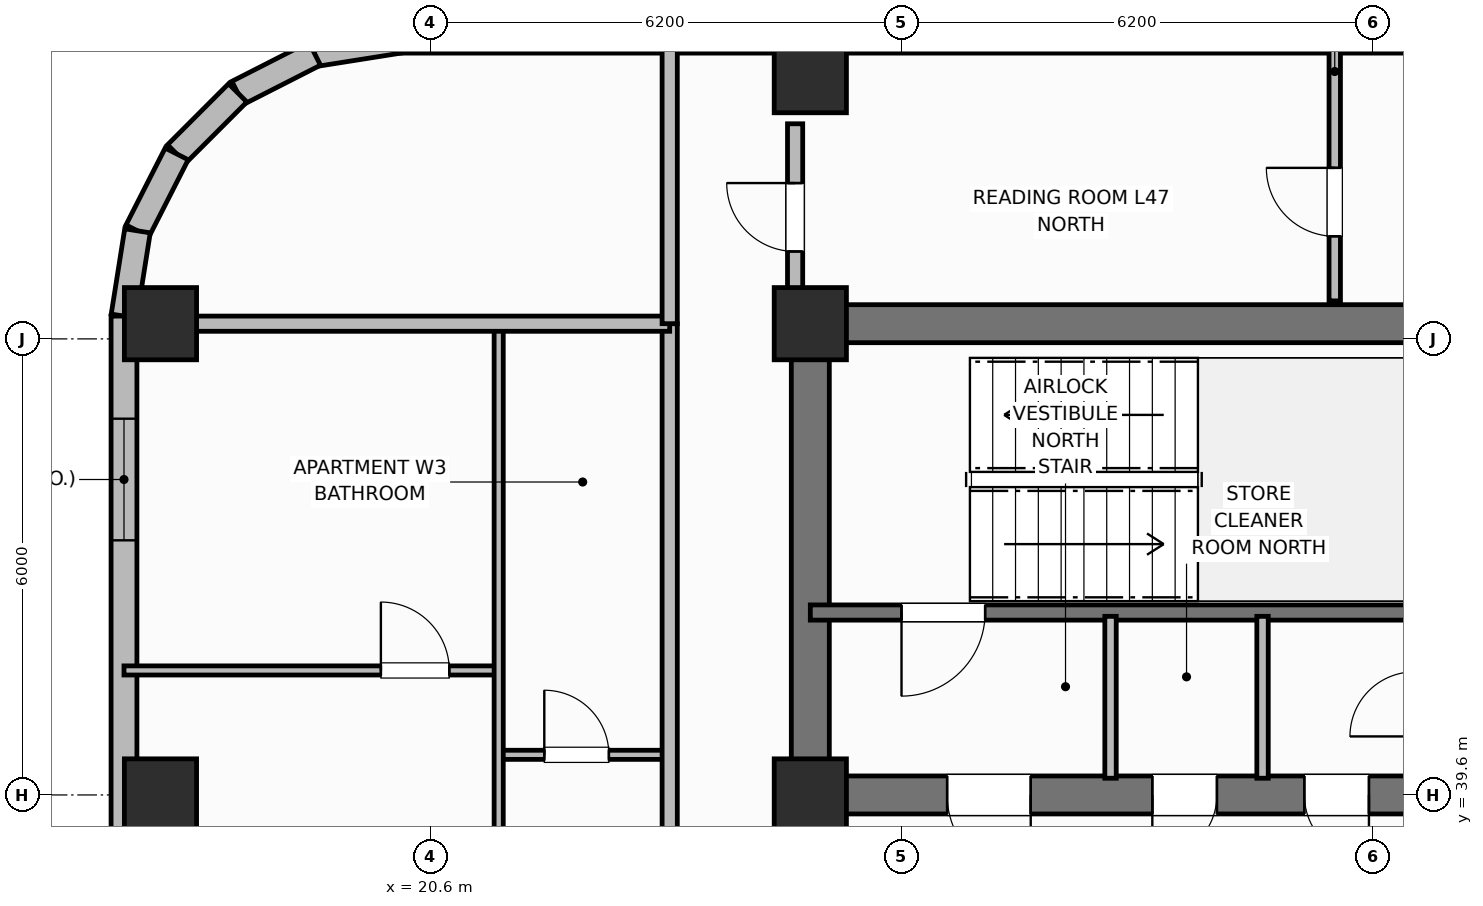
"""IFC4 building model, lengths in metres.
Left out: names, types, materials, properties, quantities, classifications, styles, units other than length and angle.
Written with IfcOpenShell. Run it as: python <this file> out.ifc"""

import sys

from ifc_helpers import new_model, si_unit, direction, frame, frame_2d, origin, origin_2d, place, context, subcontext, project, spatial, rectangle, extrude, element, fill, save


model = new_model("IFC4")
c1 = context("Model", 3, precision=1e-05, world=origin(), true_north=direction((0.0, 1.0)))
c2 = subcontext(c1, "Body", "Model", "MODEL_VIEW")
j1 = project(units=[si_unit("LENGTHUNIT", "METRE"), si_unit("PLANEANGLEUNIT", "RADIAN")], contexts=[c1])
p1 = place(None, origin())
s1 = spatial("IfcSite", under=j1, at=p1, CompositionType="ELEMENT")
p2 = place(p1, origin())
s2 = spatial("IfcBuilding", under=s1, at=p2, CompositionType="ELEMENT")
p3 = place(p2, frame((0.0, 0.0, 188.5)))
s3 = spatial("IfcBuildingStorey", under=s2, at=p3, CompositionType="ELEMENT", Elevation=188.5)
p4 = place(p3, frame((25.6, 45.8, 0.0), z_axis=(0.0, 0.0, 1.0), x_axis=(1.0, 0.0, 0.0)))
e1 = element("IfcWall", 1, at=p4, inside=s3, PredefinedType="SHEAR", context=c2, shape_type="SweptSolid", body=[
    extrude(rectangle(XDim=27.2, YDim=0.5, at=frame_2d((13.6, 0.0))), origin(), (0.0, 0.0, 1.0), 3.7),
])
p5 = place(p3, frame((25.6, 39.85, 0.0), z_axis=(0.0, 0.0, 1.0), x_axis=(0.0, 1.0, 0.0)))
e2 = element("IfcWall", 2, at=p5, inside=s3, PredefinedType="SHEAR", context=c2, shape_type="SweptSolid", body=[
    extrude(rectangle(XDim=5.7, YDim=0.5, at=frame_2d((2.85, 0.0))), origin(), (0.0, 0.0, 1.0), 3.7),
])
p6 = place(p3, frame((52.8, 39.6, 0.0), z_axis=(0.0, 0.0, 1.0), x_axis=(-1.0, 0.0, 0.0)))
e3 = element("IfcWall", 3, at=p6, inside=s3, PredefinedType="SHEAR", context=c2, shape_type="SweptSolid", body=[
    extrude(rectangle(XDim=27.2, YDim=0.5, at=frame_2d((13.6, 0.0))), origin(), (0.0, 0.0, 1.0), 3.7),
])
p7 = place(p6, frame((24.3, 0.0, 0.0)))
e4 = element("IfcOpeningElement", 4, at=p7, cuts=e3, PredefinedType="OPENING", context=c2, shape_type="SweptSolid", body=[
    extrude(rectangle(XDim=1.1, YDim=2.15, at=frame_2d((0.55, 1.075))), frame((0.0, 0.26, 0.0), z_axis=(0.0, -1.0, 0.0), x_axis=(1.0, 0.0, 0.0)), (0.0, 0.0, 1.0), 0.52),
])
p8 = place(p6, frame((21.85, 0.0, 0.0)))
e5 = element("IfcOpeningElement", 5, at=p8, cuts=e3, PredefinedType="OPENING", context=c2, shape_type="SweptSolid", body=[
    extrude(rectangle(XDim=0.85, YDim=2.1, at=frame_2d((0.425, 1.05))), frame((0.0, 0.26, 0.0), z_axis=(0.0, -1.0, 0.0), x_axis=(1.0, 0.0, 0.0)), (0.0, 0.0, 1.0), 0.52),
])
p9 = place(p6, frame((19.85, 0.0, 0.0)))
e6 = element("IfcOpeningElement", 6, at=p9, cuts=e3, PredefinedType="OPENING", context=c2, shape_type="SweptSolid", body=[
    extrude(rectangle(XDim=0.85, YDim=2.1, at=frame_2d((0.425, 1.05))), frame((0.0, 0.26, 0.0), z_axis=(0.0, -1.0, 0.0), x_axis=(1.0, 0.0, 0.0)), (0.0, 0.0, 1.0), 0.52),
])
p10 = place(p6, frame((15.1, 0.0, 0.0)))
e7 = element("IfcOpeningElement", 7, at=p10, cuts=e3, PredefinedType="OPENING", context=c2, shape_type="SweptSolid", body=[
    extrude(rectangle(XDim=1.2, YDim=2.15, at=frame_2d((0.6, 1.075))), frame((0.0, 0.26, 0.0), z_axis=(0.0, -1.0, 0.0), x_axis=(1.0, 0.0, 0.0)), (0.0, 0.0, 1.0), 0.52),
])
p11 = place(p6, frame((12.6, 0.0, 0.0)))
e8 = element("IfcOpeningElement", 8, at=p11, cuts=e3, PredefinedType="OPENING", context=c2, shape_type="SweptSolid", body=[
    extrude(rectangle(XDim=0.85, YDim=2.1, at=frame_2d((0.425, 1.05))), frame((0.0, 0.26, 0.0), z_axis=(0.0, -1.0, 0.0), x_axis=(1.0, 0.0, 0.0)), (0.0, 0.0, 1.0), 0.52),
])
p12 = place(p6, frame((10.85, 0.0, 0.0)))
e9 = element("IfcOpeningElement", 9, at=p12, cuts=e3, PredefinedType="OPENING", context=c2, shape_type="SweptSolid", body=[
    extrude(rectangle(XDim=0.85, YDim=2.1, at=frame_2d((0.425, 1.05))), frame((0.0, 0.26, 0.0), z_axis=(0.0, -1.0, 0.0), x_axis=(1.0, 0.0, 0.0)), (0.0, 0.0, 1.0), 0.52),
])
p13 = place(p6, frame((7.35, 0.0, 0.0)))
e10 = element("IfcOpeningElement", 10, at=p13, cuts=e3, PredefinedType="OPENING", context=c2, shape_type="SweptSolid", body=[
    extrude(rectangle(XDim=0.85, YDim=2.1, at=frame_2d((0.425, 1.05))), frame((0.0, 0.26, 0.0), z_axis=(0.0, -1.0, 0.0), x_axis=(1.0, 0.0, 0.0)), (0.0, 0.0, 1.0), 0.52),
])
p14 = place(p6, frame((5.35, 0.0, 0.0)))
e11 = element("IfcOpeningElement", 11, at=p14, cuts=e3, PredefinedType="OPENING", context=c2, shape_type="SweptSolid", body=[
    extrude(rectangle(XDim=0.85, YDim=2.1, at=frame_2d((0.425, 1.05))), frame((0.0, 0.26, 0.0), z_axis=(0.0, -1.0, 0.0), x_axis=(1.0, 0.0, 0.0)), (0.0, 0.0, 1.0), 0.52),
])
p15 = place(p6, frame((2.0, 0.0, 0.0)))
e12 = element("IfcOpeningElement", 12, at=p15, cuts=e3, PredefinedType="OPENING", context=c2, shape_type="SweptSolid", body=[
    extrude(rectangle(XDim=0.85, YDim=2.1, at=frame_2d((0.425, 1.05))), frame((0.0, 0.26, 0.0), z_axis=(0.0, -1.0, 0.0), x_axis=(1.0, 0.0, 0.0)), (0.0, 0.0, 1.0), 0.52),
])
for number, where, z_axis, x_axis in (
    (13, (25.6, 39.6, 0.0), (0.0, 0.0, 1.0), (1.0, 0.0, 0.0)),
    (14, (25.6, 45.8, 0.0), (0.0, 0.0, 1.0), (1.0, 0.0, 0.0)),
    (15, (25.6, 49.05, 0.0), (0.0, 0.0, 1.0), (1.0, 0.0, 0.0)),
    (16, (17.05, 39.6, 0.0), (0.0, 0.0, 1.0), (1.0, 0.0, 0.0)),
    (17, (17.05, 45.8, 0.0), (0.0, 0.0, 1.0), (1.0, 0.0, 0.0)),
):
    element("IfcColumn", number, at=place(p3, frame(where, z_axis=z_axis, x_axis=x_axis)), inside=s3, PredefinedType="COLUMN", context=c2, shape_type="SweptSolid", body=[
        extrude(rectangle(XDim=0.95, YDim=0.95, at=origin_2d()), origin(), (0.0, 0.0, 1.0), 3.7),
    ])
p16 = place(p3, frame((36.0, 49.53, 0.0), z_axis=(0.0, 0.0, 1.0), x_axis=(-1.0, 0.0, 0.0)))
e18 = element("IfcWall", 18, at=p16, inside=s3, PredefinedType="SOLIDWALL", context=c2, shape_type="SweptSolid", body=[
    extrude(rectangle(XDim=15.8, YDim=0.34, at=frame_2d((7.9, 0.0))), origin(), (0.0, 0.0, 1.0), 2.72),
])
p17 = place(p16, frame((5.188, 0.0, 0.75)))
e19 = element("IfcOpeningElement", 19, at=p17, cuts=e18, PredefinedType="OPENING", context=c2, shape_type="SweptSolid", body=[
    extrude(rectangle(XDim=1.8, YDim=1.85, at=frame_2d((0.9, 0.925))), frame((0.0, 0.18, 0.0), z_axis=(0.0, -1.0, 0.0), x_axis=(1.0, 0.0, 0.0)), (0.0, 0.0, 1.0), 0.36),
])
p18 = place(p16, frame((12.788, 0.0, 0.75)))
e20 = element("IfcOpeningElement", 20, at=p18, cuts=e18, PredefinedType="OPENING", context=c2, shape_type="SweptSolid", body=[
    extrude(rectangle(XDim=1.8, YDim=1.85, at=frame_2d((0.9, 0.925))), frame((0.0, 0.18, 0.0), z_axis=(0.0, -1.0, 0.0), x_axis=(1.0, 0.0, 0.0)), (0.0, 0.0, 1.0), 0.36),
])
p19 = place(p3, frame((20.2, 49.53, 0.0), z_axis=(0.0, 0.0, 1.0), x_axis=(-0.987675651954, -0.156514556949, 0.0)))
e21 = element("IfcWall", 21, at=p19, inside=s3, PredefinedType="SOLIDWALL", context=c2, shape_type="SweptSolid", body=[
    extrude(rectangle(XDim=1.135, YDim=0.34, at=frame_2d((0.568, 0.0))), origin(), (0.0, 0.0, 1.0), 2.72),
])
for number, where, z_axis, x_axis in (
    (22, (19.078, 49.352, 0.0), (0.0, 0.0, 1.0), (-0.891, -0.454, 0.0)),
    (23, (18.066, 48.837, 0.0), (0.0, 0.0, 1.0), (-0.707, -0.707, 0.0)),
    (24, (17.263, 48.034, 0.0), (0.0, 0.0, 1.0), (-0.454, -0.891, 0.0)),
    (25, (16.748, 47.022, 0.0), (0.0, 0.0, 1.0), (-0.156, -0.988, 0.0)),
):
    element("IfcWall", number, at=place(p3, frame(where, z_axis=z_axis, x_axis=x_axis)), inside=s3, PredefinedType="SOLIDWALL", context=c2, shape_type="SweptSolid", body=[
        extrude(rectangle(XDim=1.136, YDim=0.34, at=frame_2d((0.568, 0.0))), origin(), (0.0, 0.0, 1.0), 2.72),
    ])
p20 = place(p3, frame((16.57, 45.9, 0.0), z_axis=(0.0, 0.0, 1.0), x_axis=(0.0, -1.0, 0.0)))
e26 = element("IfcWall", 26, at=p20, inside=s3, PredefinedType="SOLIDWALL", context=c2, shape_type="SweptSolid", body=[
    extrude(rectangle(XDim=13.3, YDim=0.34, at=frame_2d((6.65, 0.0))), origin(), (0.0, 0.0, 1.0), 2.72),
])
p21 = place(p20, frame((1.35, 0.0, 0.7)))
e27 = element("IfcOpeningElement", 27, at=p21, cuts=e26, PredefinedType="OPENING", context=c2, shape_type="SweptSolid", body=[
    extrude(rectangle(XDim=1.6, YDim=1.9, at=frame_2d((0.8, 0.95))), frame((0.0, 0.18, 0.0), z_axis=(0.0, -1.0, 0.0), x_axis=(1.0, 0.0, 0.0)), (0.0, 0.0, 1.0), 0.36),
])
p22 = place(p20, frame((7.7, 0.0, 0.7)))
e28 = element("IfcOpeningElement", 28, at=p22, cuts=e26, PredefinedType="OPENING", context=c2, shape_type="SweptSolid", body=[
    extrude(rectangle(XDim=1.6, YDim=1.9, at=frame_2d((0.8, 0.95))), frame((0.0, 0.18, 0.0), z_axis=(0.0, -1.0, 0.0), x_axis=(1.0, 0.0, 0.0)), (0.0, 0.0, 1.0), 0.36),
])
p23 = place(p3, frame((35.15, 42.0, 0.0), z_axis=(0.0, 0.0, 1.0), x_axis=(-1.0, 0.0, 0.0)))
e29 = element("IfcWall", 29, at=p23, inside=s3, PredefinedType="SHEAR", context=c2, shape_type="SweptSolid", body=[
    extrude(rectangle(XDim=9.55, YDim=0.2, at=frame_2d((4.775, 0.0))), origin(), (0.0, 0.0, 1.0), 3.7),
])
p24 = place(p23, frame((7.25, 0.0, 0.0)))
e30 = element("IfcOpeningElement", 30, at=p24, cuts=e29, PredefinedType="OPENING", context=c2, shape_type="SweptSolid", body=[
    extrude(rectangle(XDim=1.1, YDim=2.15, at=frame_2d((0.55, 1.075))), frame((0.0, 0.11, 0.0), z_axis=(0.0, -1.0, 0.0), x_axis=(1.0, 0.0, 0.0)), (0.0, 0.0, 1.0), 0.22),
])
for number, where, z_axis, x_axis in (
    (31, (29.55, 39.82, 0.0), (0.0, 0.0, 1.0), (0.0, 1.0, 0.0)),
    (32, (31.55, 39.82, 0.0), (0.0, 0.0, 1.0), (0.0, 1.0, 0.0)),
):
    element("IfcWall", number, at=place(p3, frame(where, z_axis=z_axis, x_axis=x_axis)), inside=s3, PredefinedType="PARTITIONING", context=c2, shape_type="SweptSolid", body=[
        extrude(rectangle(XDim=2.13, YDim=0.15, at=frame_2d((1.065, 0.0))), origin(), (0.0, 0.0, 1.0), 2.55),
    ])
p25 = place(p3, frame((21.5, 40.128, 0.0), z_axis=(0.0, 0.0, 1.0), x_axis=(1.0, 0.0, 0.0)))
e33 = element("IfcWall", 33, at=p25, inside=s3, PredefinedType="PARTITIONING", context=c2, shape_type="SweptSolid", body=[
    extrude(rectangle(XDim=2.25, YDim=0.12, at=frame_2d((1.125, 0.0))), origin(), (0.0, 0.0, 1.0), 2.55),
])
p26 = place(p25, frame((0.6, 0.0, 0.0)))
e34 = element("IfcOpeningElement", 34, at=p26, cuts=e33, PredefinedType="OPENING", context=c2, shape_type="SweptSolid", body=[
    extrude(rectangle(XDim=0.85, YDim=2.1, at=frame_2d((0.425, 1.05))), frame((0.0, 0.07, 0.0), z_axis=(0.0, -1.0, 0.0), x_axis=(1.0, 0.0, 0.0)), (0.0, 0.0, 1.0), 0.14),
])
p27 = place(p3, frame((16.57, 41.238, 0.0), z_axis=(0.0, 0.0, 1.0), x_axis=(1.0, 0.0, 0.0)))
e35 = element("IfcWall", 35, at=p27, inside=s3, PredefinedType="PARTITIONING", context=c2, shape_type="SweptSolid", body=[
    extrude(rectangle(XDim=4.93, YDim=0.12, at=frame_2d((2.465, 0.0))), origin(), (0.0, 0.0, 1.0), 2.55),
])
p28 = place(p27, frame((3.38, 0.0, 0.0)))
e36 = element("IfcOpeningElement", 36, at=p28, cuts=e35, PredefinedType="OPENING", context=c2, shape_type="SweptSolid", body=[
    extrude(rectangle(XDim=0.9, YDim=2.1, at=frame_2d((0.45, 1.05))), frame((0.0, 0.07, 0.0), z_axis=(0.0, -1.0, 0.0), x_axis=(1.0, 0.0, 0.0)), (0.0, 0.0, 1.0), 0.14),
])
p29 = place(p3, frame((21.5, 34.928, 0.0), z_axis=(0.0, 0.0, 1.0), x_axis=(0.0, 1.0, 0.0)))
e37 = element("IfcWall", 37, at=p29, inside=s3, PredefinedType="PARTITIONING", context=c2, shape_type="SweptSolid", body=[
    extrude(rectangle(XDim=10.832, YDim=0.12, at=frame_2d((5.416, 0.0))), origin(), (0.0, 0.0, 1.0), 2.55),
])
p30 = place(p29, frame((0.41, 0.0, 0.0)))
e38 = element("IfcOpeningElement", 38, at=p30, cuts=e37, PredefinedType="OPENING", context=c2, shape_type="SweptSolid", body=[
    extrude(rectangle(XDim=0.9, YDim=2.1, at=frame_2d((0.45, 1.05))), frame((0.0, 0.07, 0.0), z_axis=(0.0, -1.0, 0.0), x_axis=(1.0, 0.0, 0.0)), (0.0, 0.0, 1.0), 0.14),
])
p31 = place(p3, frame((23.75, 10.6, 0.0), z_axis=(0.0, 0.0, 1.0), x_axis=(0.0, 1.0, 0.0)))
e39 = element("IfcWall", 39, at=p31, inside=s3, PredefinedType="PARTITIONING", context=c2, shape_type="SweptSolid", body=[
    extrude(rectangle(XDim=35.2, YDim=0.2, at=frame_2d((17.6, 0.0))), origin(), (0.0, 0.0, 1.0), 2.55),
])
p32 = place(p31, frame((2.65, 0.0, 0.0)))
e40 = element("IfcOpeningElement", 40, at=p32, cuts=e39, PredefinedType="OPENING", context=c2, shape_type="SweptSolid", body=[
    extrude(rectangle(XDim=1.0, YDim=2.15, at=frame_2d((0.5, 1.075))), frame((0.0, 0.11, 0.0), z_axis=(0.0, -1.0, 0.0), x_axis=(1.0, 0.0, 0.0)), (0.0, 0.0, 1.0), 0.22),
])
p33 = place(p31, frame((13.222, 0.0, 0.0)))
e41 = element("IfcOpeningElement", 41, at=p33, cuts=e39, PredefinedType="OPENING", context=c2, shape_type="SweptSolid", body=[
    extrude(rectangle(XDim=1.0, YDim=2.15, at=frame_2d((0.5, 1.075))), frame((0.0, 0.11, 0.0), z_axis=(0.0, -1.0, 0.0), x_axis=(1.0, 0.0, 0.0)), (0.0, 0.0, 1.0), 0.22),
])
p34 = place(p31, frame((24.838, 0.0, 0.0)))
e42 = element("IfcOpeningElement", 42, at=p34, cuts=e39, PredefinedType="OPENING", context=c2, shape_type="SweptSolid", body=[
    extrude(rectangle(XDim=1.0, YDim=2.15, at=frame_2d((0.5, 1.075))), frame((0.0, 0.11, 0.0), z_axis=(0.0, -1.0, 0.0), x_axis=(1.0, 0.0, 0.0)), (0.0, 0.0, 1.0), 0.22),
])
p35 = place(p3, frame((16.99, 45.8, 0.0), z_axis=(0.0, 0.0, 1.0), x_axis=(1.0, 0.0, 0.0)))
e43 = element("IfcWall", 43, at=p35, inside=s3, PredefinedType="PARTITIONING", context=c2, shape_type="SweptSolid", body=[
    extrude(rectangle(XDim=6.76, YDim=0.2, at=frame_2d((3.38, 0.0))), origin(), (0.0, 0.0, 1.0), 2.55),
])
p36 = place(p3, frame((23.75, 45.8, 0.0), z_axis=(0.0, 0.0, 1.0), x_axis=(0.0, 1.0, 0.0)))
e44 = element("IfcWall", 44, at=p36, inside=s3, PredefinedType="PARTITIONING", context=c2, shape_type="SweptSolid", body=[
    extrude(rectangle(XDim=3.73, YDim=0.2, at=frame_2d((1.865, 0.0))), origin(), (0.0, 0.0, 1.0), 2.55),
])
p37 = place(p3, frame((32.5, 46.1, 0.0), z_axis=(0.0, 0.0, 1.0), x_axis=(0.0, 1.0, 0.0)))
e45 = element("IfcWall", 45, at=p37, inside=s3, PredefinedType="PARTITIONING", context=c2, shape_type="SweptSolid", body=[
    extrude(rectangle(XDim=3.43, YDim=0.15, at=frame_2d((1.715, 0.0))), origin(), (0.0, 0.0, 1.0), 2.55),
])
p38 = place(p37, frame((0.85, 0.0, 0.0)))
e46 = element("IfcOpeningElement", 46, at=p38, cuts=e45, PredefinedType="OPENING", context=c2, shape_type="SweptSolid", body=[
    extrude(rectangle(XDim=0.9, YDim=2.1, at=frame_2d((0.45, 1.05))), frame((0.0, 0.085, 0.0), z_axis=(0.0, -1.0, 0.0), x_axis=(1.0, 0.0, 0.0)), (0.0, 0.0, 1.0), 0.17),
])
p39 = place(p3, frame((25.4, 46.1, 0.0), z_axis=(0.0, 0.0, 1.0), x_axis=(0.0, 1.0, 0.0)))
e47 = element("IfcWall", 47, at=p39, inside=s3, PredefinedType="PARTITIONING", context=c2, shape_type="SweptSolid", body=[
    extrude(rectangle(XDim=2.33, YDim=0.2, at=frame_2d((1.165, 0.0))), origin(), (0.0, 0.0, 1.0), 2.55),
])
p40 = place(p39, frame((0.65, 0.0, 0.0)))
e48 = element("IfcOpeningElement", 48, at=p40, cuts=e47, PredefinedType="OPENING", context=c2, shape_type="SweptSolid", body=[
    extrude(rectangle(XDim=0.9, YDim=2.1, at=frame_2d((0.45, 1.05))), frame((0.0, 0.11, 0.0), z_axis=(0.0, -1.0, 0.0), x_axis=(1.0, 0.0, 0.0)), (0.0, 0.0, 1.0), 0.22),
])
p41 = place(p21, origin())
e49 = element("IfcWindow", 49, at=p41, inside=s3, PartitioningType="SINGLE_PANEL", PredefinedType="WINDOW", context=c2, shape_type="SweptSolid", body=[
    extrude(rectangle(XDim=1.6, YDim=1.9, at=frame_2d((0.8, 0.95))), frame((0.0, 0.03, 0.0), z_axis=(0.0, -1.0, 0.0), x_axis=(1.0, 0.0, 0.0)), (0.0, 0.0, 1.0), 0.06),
])
fill(e27, e49)
p42 = place(p24, origin())
e50 = element("IfcDoor", 50, at=p42, inside=s3, OperationType="SINGLE_SWING_RIGHT", PredefinedType="DOOR", context=c2, shape_type="SweptSolid", body=[
    extrude(rectangle(XDim=1.1, YDim=2.15, at=frame_2d((0.55, 1.075))), frame((0.0, 0.025, 0.0), z_axis=(0.0, -1.0, 0.0), x_axis=(1.0, 0.0, 0.0)), (0.0, 0.0, 1.0), 0.05),
])
fill(e30, e50)
p43 = place(p26, origin())
e51 = element("IfcDoor", 51, at=p43, inside=s3, OperationType="SINGLE_SWING_LEFT", PredefinedType="DOOR", context=c2, shape_type="SweptSolid", body=[
    extrude(rectangle(XDim=0.85, YDim=2.1, at=frame_2d((0.425, 1.05))), frame((0.0, 0.025, 0.0), z_axis=(0.0, -1.0, 0.0), x_axis=(1.0, 0.0, 0.0)), (0.0, 0.0, 1.0), 0.05),
])
fill(e34, e51)
p44 = place(p28, origin())
e52 = element("IfcDoor", 52, at=p44, inside=s3, OperationType="SINGLE_SWING_LEFT", PredefinedType="DOOR", context=c2, shape_type="SweptSolid", body=[
    extrude(rectangle(XDim=0.9, YDim=2.1, at=frame_2d((0.45, 1.05))), frame((0.0, 0.025, 0.0), z_axis=(0.0, -1.0, 0.0), x_axis=(1.0, 0.0, 0.0)), (0.0, 0.0, 1.0), 0.05),
])
fill(e36, e52)
p45 = place(p38, origin())
e53 = element("IfcDoor", 53, at=p45, inside=s3, OperationType="SINGLE_SWING_RIGHT", PredefinedType="DOOR", context=c2, shape_type="SweptSolid", body=[
    extrude(rectangle(XDim=0.9, YDim=2.1, at=frame_2d((0.45, 1.05))), frame((0.0, 0.025, 0.0), z_axis=(0.0, -1.0, 0.0), x_axis=(1.0, 0.0, 0.0)), (0.0, 0.0, 1.0), 0.05),
])
fill(e46, e53)
p46 = place(p40, origin())
e54 = element("IfcDoor", 54, at=p46, inside=s3, OperationType="SINGLE_SWING_RIGHT", PredefinedType="DOOR", context=c2, shape_type="SweptSolid", body=[
    extrude(rectangle(XDim=0.9, YDim=2.1, at=frame_2d((0.45, 1.05))), frame((0.0, 0.025, 0.0), z_axis=(0.0, -1.0, 0.0), x_axis=(1.0, 0.0, 0.0)), (0.0, 0.0, 1.0), 0.05),
])
fill(e48, e54)
p47 = place(p7, origin())
e55 = element("IfcDoor", 55, at=p47, inside=s3, OperationType="SINGLE_SWING_LEFT", PredefinedType="DOOR", context=c2, shape_type="SweptSolid", body=[
    extrude(rectangle(XDim=1.1, YDim=2.15, at=frame_2d((0.55, 1.075))), frame((0.0, 0.025, 0.0), z_axis=(0.0, -1.0, 0.0), x_axis=(1.0, 0.0, 0.0)), (0.0, 0.0, 1.0), 0.05),
])
fill(e4, e55)
p48 = place(p8, origin())
e56 = element("IfcDoor", 56, at=p48, inside=s3, OperationType="SINGLE_SWING_RIGHT", PredefinedType="DOOR", context=c2, shape_type="SweptSolid", body=[
    extrude(rectangle(XDim=0.85, YDim=2.1, at=frame_2d((0.425, 1.05))), frame((0.0, 0.025, 0.0), z_axis=(0.0, -1.0, 0.0), x_axis=(1.0, 0.0, 0.0)), (0.0, 0.0, 1.0), 0.05),
])
fill(e5, e56)
p49 = place(p9, origin())
e57 = element("IfcDoor", 57, at=p49, inside=s3, OperationType="SINGLE_SWING_LEFT", PredefinedType="DOOR", context=c2, shape_type="SweptSolid", body=[
    extrude(rectangle(XDim=0.85, YDim=2.1, at=frame_2d((0.425, 1.05))), frame((0.0, 0.025, 0.0), z_axis=(0.0, -1.0, 0.0), x_axis=(1.0, 0.0, 0.0)), (0.0, 0.0, 1.0), 0.05),
])
fill(e6, e57)
save(model, sys.argv[1])
